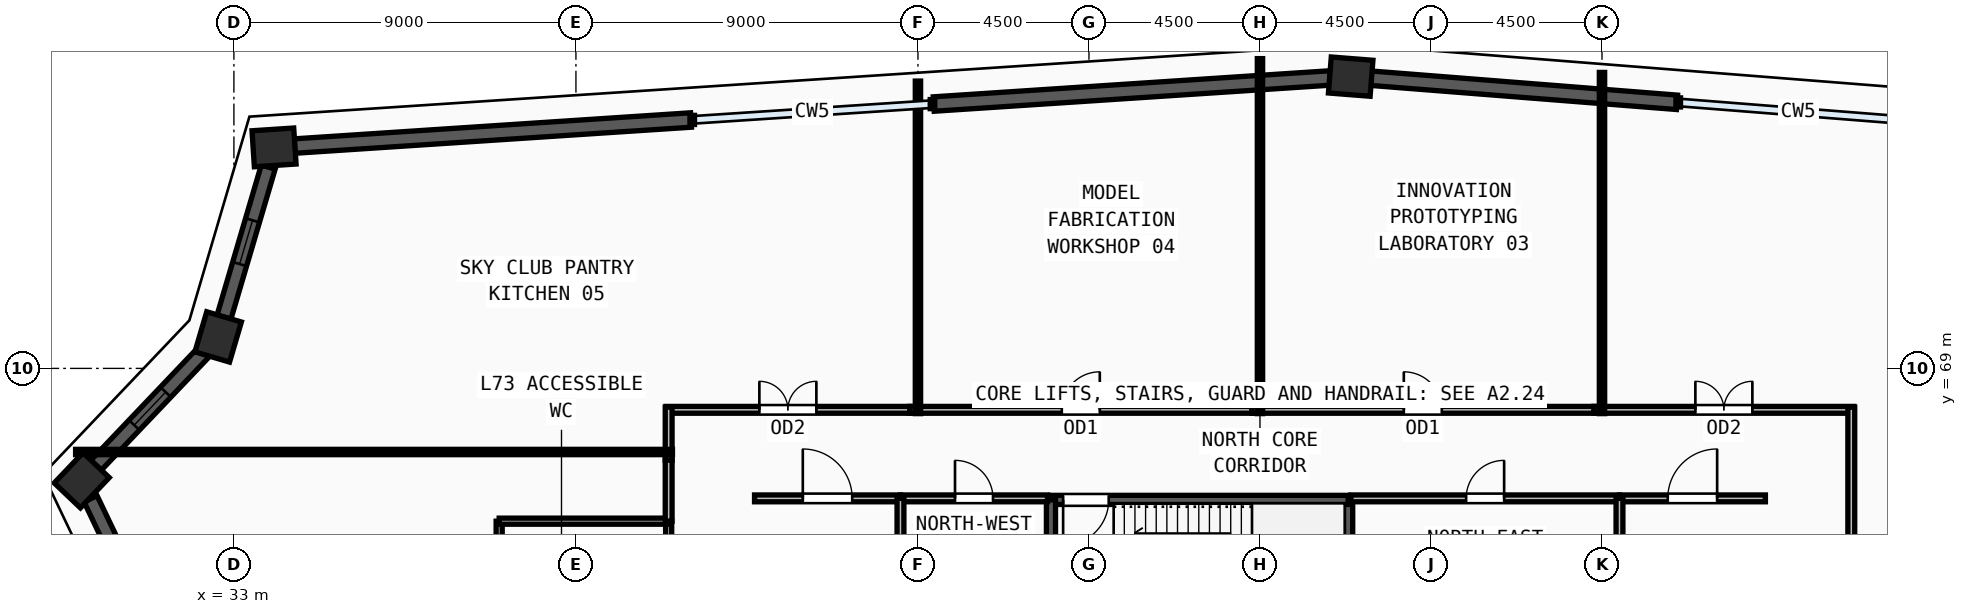
"""IFC4 building model, lengths in metres.
Left out: names, types, materials, properties, quantities, classifications, styles, units other than length and angle.
Written with IfcOpenShell. Run it as: python <this file> out.ifc"""

import sys

from ifc_helpers import new_model, si_unit, direction, frame, frame_2d, origin, origin_2d, place, context, subcontext, project, spatial, rectangle, extrude, source, transform, mapped, element, fill, save


model = new_model("IFC4")
c1 = context("Model", 3, precision=1e-05, world=origin(), true_north=direction((0.0, 1.0)))
c2 = subcontext(c1, "Body", "Model", "MODEL_VIEW")
j1 = project(units=[si_unit("LENGTHUNIT", "METRE"), si_unit("PLANEANGLEUNIT", "RADIAN")], contexts=[c1])
p1 = place(None, origin())
s1 = spatial("IfcSite", under=j1, at=p1, CompositionType="ELEMENT")
p2 = place(p1, origin())
s2 = spatial("IfcBuilding", under=s1, at=p2, CompositionType="ELEMENT")
p3 = place(p2, frame((0.0, 0.0, 282.0)))
s3 = spatial("IfcBuildingStorey", under=s2, at=p3, CompositionType="ELEMENT", Elevation=282.0)
m1 = source(origin(), c2, "Body", "SweptSolid", [
    extrude(rectangle(XDim=1.1, YDim=0.95, at=origin_2d()), origin(), (0.0, 0.0, 1.0), 4.5),
])
for number, where, z_axis, x_axis in (
    (1, (28.996, 66.056, 0.0), (0.0, 0.0, 1.0), (0.689, 0.724, 0.0)),
    (2, (32.585, 69.828, 0.0), (0.0, 0.0, 1.0), (0.283, 0.959, 0.0)),
    (3, (34.056, 74.815, 0.0), (0.0, 0.0, 1.0), (0.998, 0.066, 0.0)),
    (4, (62.387, 76.677, 0.0), (0.0, 0.0, 1.0), (-0.997, 0.078, 0.0)),
):
    element("IfcColumn", number, at=place(p3, frame(where, z_axis=z_axis, x_axis=x_axis)), inside=s3, PredefinedType="COLUMN", context=c2, shape_type="MappedRepresentation", body=[
        mapped(m1, transform((0.0, 0.0, 0.0), x_axis=(1.0, 0.0, 0.0), y_axis=(0.0, 1.0, 0.0), z_axis=(0.0, 0.0, 1.0), scale=1.0)),
    ])
p4 = place(p3, frame((70.974, 76.001, 0.0), z_axis=(0.0, 0.0, 1.0), x_axis=(-0.996911930787, 0.078527716469, 0.0)))
e5 = element("IfcWall", 5, at=p4, inside=s3, PredefinedType="SOLIDWALL", context=c2, shape_type="SweptSolid", body=[
    extrude(rectangle(XDim=8.074, YDim=0.38, at=frame_2d((4.037, 0.0))), origin(), (0.0, 0.0, 1.0), 4.32),
])
p5 = place(p3, frame((61.848, 76.642, 0.0), z_axis=(0.0, 0.0, 1.0), x_axis=(-0.997844985263, -0.065615435579, 0.0)))
e6 = element("IfcWall", 6, at=p5, inside=s3, PredefinedType="SOLIDWALL", context=c2, shape_type="SweptSolid", body=[
    extrude(rectangle(XDim=10.455, YDim=0.38, at=frame_2d((5.228, 0.0))), origin(), (0.0, 0.0, 1.0), 4.32),
])
p6 = place(p3, frame((45.028, 75.536, 0.0), z_axis=(0.0, 0.0, 1.0), x_axis=(-0.997846614317, -0.065590657079, 0.0)))
e7 = element("IfcWall", 7, at=p6, inside=s3, PredefinedType="SOLIDWALL", context=c2, shape_type="SweptSolid", body=[
    extrude(rectangle(XDim=10.456, YDim=0.38, at=frame_2d((5.228, 0.0))), origin(), (0.0, 0.0, 1.0), 4.32),
])
p7 = place(p3, frame((33.903, 74.297, 0.0), z_axis=(0.0, 0.0, 1.0), x_axis=(-0.282820834806, -0.959172755764, 0.0)))
e8 = element("IfcWall", 8, at=p7, inside=s3, PredefinedType="SOLIDWALL", context=c2, shape_type="SweptSolid", body=[
    extrude(rectangle(XDim=4.119, YDim=0.38, at=frame_2d((2.06, 0.0))), origin(), (0.0, 0.0, 1.0), 4.32),
])
m2 = source(origin(), c2, "Body", "SweptSolid", [
    extrude(rectangle(XDim=1.2, YDim=1.9, at=frame_2d((0.6, 0.95))), frame((0.0, 0.2, 0.0), z_axis=(0.0, -1.0, 0.0), x_axis=(1.0, 0.0, 0.0)), (0.0, 0.0, 1.0), 0.4),
])
p8 = place(p7, frame((1.46, 0.0, 0.55)))
e9 = element("IfcOpeningElement", 9, at=p8, cuts=e8, PredefinedType="OPENING", context=c2, shape_type="MappedRepresentation", body=[
    mapped(m2, transform((0.0, 0.0, 0.0), x_axis=(1.0, 0.0, 0.0), y_axis=(0.0, 1.0, 0.0), z_axis=(0.0, 0.0, 1.0), scale=1.0)),
])
p9 = place(p3, frame((32.213, 69.437, 0.0), z_axis=(0.0, 0.0, 1.0), x_axis=(-0.689319799557, -0.724457185718, 0.0)))
e10 = element("IfcWall", 10, at=p9, inside=s3, PredefinedType="SOLIDWALL", context=c2, shape_type="SweptSolid", body=[
    extrude(rectangle(XDim=4.127, YDim=0.38, at=frame_2d((2.063, 0.0))), origin(), (0.0, 0.0, 1.0), 4.32),
])
p10 = place(p9, frame((1.464, 0.0, 0.55)))
e11 = element("IfcOpeningElement", 11, at=p10, cuts=e10, PredefinedType="OPENING", context=c2, shape_type="MappedRepresentation", body=[
    mapped(m2, transform((0.0, 0.0, 0.0), x_axis=(1.0, 0.0, 0.0), y_axis=(0.0, 1.0, 0.0), z_axis=(0.0, 0.0, 1.0), scale=1.0)),
])
p11 = place(p3, frame((29.228, 65.569, 0.0), z_axis=(0.0, 0.0, 1.0), x_axis=(0.430494504743, -0.902593198172, 0.0)))
e12 = element("IfcWall", 12, at=p11, inside=s3, PredefinedType="SOLIDWALL", context=c2, shape_type="SweptSolid", body=[
    extrude(rectangle(XDim=8.075, YDim=0.38, at=frame_2d((4.037, 0.0))), origin(), (0.0, 0.0, 1.0), 4.32),
])
p12 = place(p3, frame((62.32, 62.1, 0.0), z_axis=(0.0, 0.0, 1.0), x_axis=(0.0, 1.0, 0.0)))
e13 = element("IfcWall", 13, at=p12, inside=s3, PredefinedType="SOLIDWALL", context=c2, shape_type="SweptSolid", body=[
    extrude(rectangle(XDim=3.44, YDim=0.24, at=frame_2d((1.72, 0.0))), origin(), (0.0, 0.0, 1.0), 4.32),
])
p13 = place(p3, frame((62.32, 65.54, 0.0), z_axis=(0.0, 0.0, 1.0), x_axis=(-1.0, 0.0, 0.0)))
e14 = element("IfcWall", 14, at=p13, inside=s3, PredefinedType="SOLIDWALL", context=c2, shape_type="SweptSolid", body=[
    extrude(rectangle(XDim=7.82, YDim=0.24, at=frame_2d((3.91, 0.0))), origin(), (0.0, 0.0, 1.0), 4.32),
])
m3 = source(origin(), c2, "Body", "SweptSolid", [
    extrude(rectangle(XDim=1.2, YDim=2.2, at=frame_2d((0.6, 1.1))), frame((0.0, 0.13, 0.0), z_axis=(0.0, -1.0, 0.0), x_axis=(1.0, 0.0, 0.0)), (0.0, 0.0, 1.0), 0.26),
])
p14 = place(p13, frame((6.3, 0.0, 0.0)))
e15 = element("IfcOpeningElement", 15, at=p14, cuts=e14, PredefinedType="OPENING", context=c2, shape_type="MappedRepresentation", body=[
    mapped(m3, transform((0.0, 0.0, 0.0), x_axis=(1.0, 0.0, 0.0), y_axis=(0.0, 1.0, 0.0), z_axis=(0.0, 0.0, 1.0), scale=1.0)),
])
p15 = place(p3, frame((54.5, 65.54, 0.0), z_axis=(0.0, 0.0, 1.0), x_axis=(0.0, -1.0, 0.0)))
e16 = element("IfcWall", 16, at=p15, inside=s3, PredefinedType="SOLIDWALL", context=c2, shape_type="SweptSolid", body=[
    extrude(rectangle(XDim=3.44, YDim=0.24, at=frame_2d((1.72, 0.0))), origin(), (0.0, 0.0, 1.0), 4.32),
])
p16 = place(p3, frame((44.44, 62.24, 0.0), z_axis=(0.0, 0.0, 1.0), x_axis=(0.0, 1.0, 0.0)))
e17 = element("IfcWall", 17, at=p16, inside=s3, PredefinedType="PARTITIONING", context=c2, shape_type="SweptSolid", body=[
    extrude(rectangle(XDim=2.74, YDim=0.16, at=frame_2d((1.37, 0.0))), origin(), (0.0, 0.0, 1.0), 4.32),
])
m4 = source(origin(), c2, "Body", "SweptSolid", [
    extrude(rectangle(XDim=1.05, YDim=2.15, at=frame_2d((0.525, 1.075))), frame((0.0, 0.09, 0.0), z_axis=(0.0, -1.0, 0.0), x_axis=(1.0, 0.0, 0.0)), (0.0, 0.0, 1.0), 0.18),
])
p17 = place(p16, frame((0.845, 0.0, 0.0)))
e18 = element("IfcOpeningElement", 18, at=p17, cuts=e17, PredefinedType="OPENING", context=c2, shape_type="MappedRepresentation", body=[
    mapped(m4, transform((0.0, 0.0, 0.0), x_axis=(1.0, 0.0, 0.0), y_axis=(0.0, 1.0, 0.0), z_axis=(0.0, 0.0, 1.0), scale=1.0)),
])
p18 = place(p3, frame((50.54, 65.58, 0.0), z_axis=(0.0, 0.0, 1.0), x_axis=(1.0, 0.0, 0.0)))
e19 = element("IfcWall", 19, at=p18, inside=s3, PredefinedType="PARTITIONING", context=c2, shape_type="SweptSolid", body=[
    extrude(rectangle(XDim=3.87, YDim=0.18, at=frame_2d((1.935, 0.0))), origin(), (0.0, 0.0, 1.0), 4.32),
])
m5 = source(origin(), c2, "Body", "SweptSolid", [
    extrude(rectangle(XDim=1.0, YDim=2.2, at=frame_2d((0.5, 1.1))), frame((0.0, 0.1, 0.0), z_axis=(0.0, -1.0, 0.0), x_axis=(1.0, 0.0, 0.0)), (0.0, 0.0, 1.0), 0.2),
])
p19 = place(p18, frame((1.435, 0.0, 0.0)))
e20 = element("IfcOpeningElement", 20, at=p19, cuts=e19, PredefinedType="OPENING", context=c2, shape_type="MappedRepresentation", body=[
    mapped(m5, transform((0.0, 0.0, 0.0), x_axis=(1.0, 0.0, 0.0), y_axis=(0.0, 1.0, 0.0), z_axis=(0.0, 0.0, 1.0), scale=1.0)),
])
p20 = place(p3, frame((62.39, 65.58, 0.0), z_axis=(0.0, 0.0, 1.0), x_axis=(1.0, 0.0, 0.0)))
e21 = element("IfcWall", 21, at=p20, inside=s3, PredefinedType="PARTITIONING", context=c2, shape_type="SweptSolid", body=[
    extrude(rectangle(XDim=7.07, YDim=0.18, at=frame_2d((3.535, 0.0))), origin(), (0.0, 0.0, 1.0), 4.32),
])
p21 = place(p20, frame((3.035, 0.0, 0.0)))
e22 = element("IfcOpeningElement", 22, at=p21, cuts=e21, PredefinedType="OPENING", context=c2, shape_type="MappedRepresentation", body=[
    mapped(m5, transform((0.0, 0.0, 0.0), x_axis=(1.0, 0.0, 0.0), y_axis=(0.0, 1.0, 0.0), z_axis=(0.0, 0.0, 1.0), scale=1.0)),
])
p22 = place(p3, frame((46.7, 65.58, 0.0), z_axis=(0.0, 0.0, 1.0), x_axis=(1.0, 0.0, 0.0)))
e23 = element("IfcWall", 23, at=p22, inside=s3, PredefinedType="PARTITIONING", context=c2, shape_type="SweptSolid", body=[
    extrude(rectangle(XDim=3.84, YDim=0.18, at=frame_2d((1.92, 0.0))), origin(), (0.0, 0.0, 1.0), 4.32),
])
m6 = source(origin(), c2, "Body", "SweptSolid", [
    extrude(rectangle(XDim=1.3, YDim=2.2, at=frame_2d((0.65, 1.1))), frame((0.0, 0.1, 0.0), z_axis=(0.0, -1.0, 0.0), x_axis=(1.0, 0.0, 0.0)), (0.0, 0.0, 1.0), 0.2),
])
p23 = place(p22, frame((1.27, 0.0, 0.0)))
e24 = element("IfcOpeningElement", 24, at=p23, cuts=e23, PredefinedType="OPENING", context=c2, shape_type="MappedRepresentation", body=[
    mapped(m6, transform((0.0, 0.0, 0.0), x_axis=(1.0, 0.0, 0.0), y_axis=(0.0, 1.0, 0.0), z_axis=(0.0, 0.0, 1.0), scale=1.0)),
])
p24 = place(p3, frame((69.46, 65.58, 0.0), z_axis=(0.0, 0.0, 1.0), x_axis=(1.0, 0.0, 0.0)))
e25 = element("IfcWall", 25, at=p24, inside=s3, PredefinedType="PARTITIONING", context=c2, shape_type="SweptSolid", body=[
    extrude(rectangle(XDim=3.84, YDim=0.18, at=frame_2d((1.92, 0.0))), origin(), (0.0, 0.0, 1.0), 4.32),
])
p25 = place(p24, frame((1.27, 0.0, 0.0)))
e26 = element("IfcOpeningElement", 26, at=p25, cuts=e25, PredefinedType="OPENING", context=c2, shape_type="MappedRepresentation", body=[
    mapped(m6, transform((0.0, 0.0, 0.0), x_axis=(1.0, 0.0, 0.0), y_axis=(0.0, 1.0, 0.0), z_axis=(0.0, 0.0, 1.0), scale=1.0)),
])
p26 = place(p3, frame((68.785, 67.91, 0.0), z_axis=(0.0, 0.0, 1.0), x_axis=(1.0, 0.0, 0.0)))
e27 = element("IfcWall", 27, at=p26, inside=s3, PredefinedType="PARTITIONING", context=c2, shape_type="SweptSolid", body=[
    extrude(rectangle(XDim=6.845, YDim=0.18, at=frame_2d((3.422, 0.0))), origin(), (0.0, 0.0, 1.0), 4.011),
])
m7 = source(origin(), c2, "Body", "SweptSolid", [
    extrude(rectangle(XDim=1.5, YDim=2.2, at=frame_2d((0.75, 1.1))), frame((0.0, 0.1, 0.0), z_axis=(0.0, -1.0, 0.0), x_axis=(1.0, 0.0, 0.0)), (0.0, 0.0, 1.0), 0.2),
])
p27 = place(p26, frame((2.672, 0.0, 0.0)))
e28 = element("IfcOpeningElement", 28, at=p27, cuts=e27, PredefinedType="OPENING", context=c2, shape_type="MappedRepresentation", body=[
    mapped(m7, transform((0.0, 0.0, 0.0), x_axis=(1.0, 0.0, 0.0), y_axis=(0.0, 1.0, 0.0), z_axis=(0.0, 0.0, 1.0), scale=1.0)),
])
p28 = place(p3, frame((59.785, 67.91, 0.0), z_axis=(0.0, 0.0, 1.0), x_axis=(1.0, 0.0, 0.0)))
e29 = element("IfcWall", 29, at=p28, inside=s3, PredefinedType="PARTITIONING", context=c2, shape_type="SweptSolid", body=[
    extrude(rectangle(XDim=9.0, YDim=0.18, at=frame_2d((4.5, 0.0))), origin(), (0.0, 0.0, 1.0), 4.011),
])
p29 = place(p28, frame((4.0, 0.0, 0.0)))
e30 = element("IfcOpeningElement", 30, at=p29, cuts=e29, PredefinedType="OPENING", context=c2, shape_type="MappedRepresentation", body=[
    mapped(m5, transform((0.0, 0.0, 0.0), x_axis=(1.0, 0.0, 0.0), y_axis=(0.0, 1.0, 0.0), z_axis=(0.0, 0.0, 1.0), scale=1.0)),
])
p30 = place(p3, frame((50.785, 67.91, 0.0), z_axis=(0.0, 0.0, 1.0), x_axis=(1.0, 0.0, 0.0)))
e31 = element("IfcWall", 31, at=p30, inside=s3, PredefinedType="PARTITIONING", context=c2, shape_type="SweptSolid", body=[
    extrude(rectangle(XDim=9.0, YDim=0.18, at=frame_2d((4.5, 0.0))), origin(), (0.0, 0.0, 1.0), 4.011),
])
p31 = place(p30, frame((4.0, 0.0, 0.0)))
e32 = element("IfcOpeningElement", 32, at=p31, cuts=e31, PredefinedType="OPENING", context=c2, shape_type="MappedRepresentation", body=[
    mapped(m5, transform((0.0, 0.0, 0.0), x_axis=(1.0, 0.0, 0.0), y_axis=(0.0, 1.0, 0.0), z_axis=(0.0, 0.0, 1.0), scale=1.0)),
])
p32 = place(p3, frame((44.37, 67.91, 0.0), z_axis=(0.0, 0.0, 1.0), x_axis=(1.0, 0.0, 0.0)))
e33 = element("IfcWall", 33, at=p32, inside=s3, PredefinedType="PARTITIONING", context=c2, shape_type="SweptSolid", body=[
    extrude(rectangle(XDim=6.415, YDim=0.18, at=frame_2d((3.208, 0.0))), origin(), (0.0, 0.0, 1.0), 4.32),
])
p33 = place(p32, frame((2.457, 0.0, 0.0)))
e34 = element("IfcOpeningElement", 34, at=p33, cuts=e33, PredefinedType="OPENING", context=c2, shape_type="MappedRepresentation", body=[
    mapped(m7, transform((0.0, 0.0, 0.0), x_axis=(1.0, 0.0, 0.0), y_axis=(0.0, 1.0, 0.0), z_axis=(0.0, 0.0, 1.0), scale=1.0)),
])
p34 = place(p3, frame((39.98, 56.34, 0.0), z_axis=(0.0, 0.0, 1.0), x_axis=(0.0, 1.0, 0.0)))
e35 = element("IfcWall", 35, at=p34, inside=s3, PredefinedType="PARTITIONING", context=c2, shape_type="SweptSolid", body=[
    extrude(rectangle(XDim=8.64, YDim=0.16, at=frame_2d((4.32, 0.0))), origin(), (0.0, 0.0, 1.0), 4.32),
])
p35 = place(p3, frame((39.98, 64.98, 0.0), z_axis=(0.0, 0.0, 1.0), x_axis=(1.0, 0.0, 0.0)))
e36 = element("IfcWall", 36, at=p35, inside=s3, PredefinedType="PARTITIONING", context=c2, shape_type="SweptSolid", body=[
    extrude(rectangle(XDim=4.46, YDim=0.16, at=frame_2d((2.23, 0.0))), origin(), (0.0, 0.0, 1.0), 4.32),
])
for number, where, z_axis, x_axis in (
    (37, (50.54, 61.95, 0.0), (0.0, 0.0, 1.0), (0.0, 1.0, 0.0)),
    (38, (69.46, 61.95, 0.0), (0.0, 0.0, 1.0), (0.0, 1.0, 0.0)),
):
    element("IfcWall", number, at=place(p3, frame(where, z_axis=z_axis, x_axis=x_axis)), inside=s3, PredefinedType="PARTITIONING", context=c2, shape_type="SweptSolid", body=[
        extrude(rectangle(XDim=3.63, YDim=0.18, at=frame_2d((1.815, 0.0))), origin(), (0.0, 0.0, 1.0), 4.32),
    ])
p36 = place(p3, frame((75.56, 67.98, 0.0), z_axis=(0.0, 0.0, 1.0), x_axis=(0.0, -1.0, 0.0)))
e39 = element("IfcWall", 39, at=p36, inside=s3, PredefinedType="PARTITIONING", context=c2, shape_type="SweptSolid", body=[
    extrude(rectangle(XDim=3.765, YDim=0.18, at=frame_2d((1.882, 0.0))), origin(), (0.0, 0.0, 1.0), 4.32),
])
p37 = place(p3, frame((44.44, 66.585, 0.0), z_axis=(0.0, 0.0, 1.0), x_axis=(0.0, 1.0, 0.0)))
e40 = element("IfcWall", 40, at=p37, inside=s3, PredefinedType="PARTITIONING", context=c2, shape_type="SweptSolid", body=[
    extrude(rectangle(XDim=1.395, YDim=0.18, at=frame_2d((0.698, 0.0))), origin(), (0.0, 0.0, 1.0), 4.32),
])
p38 = place(p3, frame((44.44, 64.98, 0.0), z_axis=(0.0, 0.0, 1.0), x_axis=(0.0, 1.0, 0.0)))
e41 = element("IfcWall", 41, at=p38, inside=s3, PredefinedType="PARTITIONING", context=c2, shape_type="SweptSolid", body=[
    extrude(rectangle(XDim=1.605, YDim=0.18, at=frame_2d((0.802, 0.0))), origin(), (0.0, 0.0, 1.0), 4.32),
])
p39 = place(p3, frame((44.54, 66.8, 0.0), z_axis=(0.0, 0.0, 1.0), x_axis=(-1.0, 0.0, 0.0)))
e42 = element("IfcWall", 42, at=p39, inside=s3, PredefinedType="PARTITIONING", context=c2, shape_type="SweptSolid", body=[
    extrude(rectangle(XDim=15.706, YDim=0.14, at=frame_2d((7.853, 0.0))), origin(), (0.0, 0.0, 1.0), 4.32),
])
p40 = place(p3, frame((51.0, 67.81, 0.0), z_axis=(0.0, 0.0, 1.0), x_axis=(0.0, 1.0, 0.0)))
e43 = element("IfcWall", 43, at=p40, inside=s3, PredefinedType="PARTITIONING", context=c2, shape_type="SweptSolid", body=[
    extrude(rectangle(XDim=8.75, YDim=0.14, at=frame_2d((4.375, 0.0))), origin(), (0.0, 0.0, 1.0), 4.32),
])
p41 = place(p3, frame((60.0, 67.81, 0.0), z_axis=(0.0, 0.0, 1.0), x_axis=(0.0, 1.0, 0.0)))
e44 = element("IfcWall", 44, at=p41, inside=s3, PredefinedType="PARTITIONING", context=c2, shape_type="SweptSolid", body=[
    extrude(rectangle(XDim=9.341, YDim=0.14, at=frame_2d((4.67, 0.0))), origin(), (0.0, 0.0, 1.0), 4.32),
])
p42 = place(p3, frame((69.0, 67.81, 0.0), z_axis=(0.0, 0.0, 1.0), x_axis=(0.0, 1.0, 0.0)))
e45 = element("IfcWall", 45, at=p42, inside=s3, PredefinedType="PARTITIONING", context=c2, shape_type="SweptSolid", body=[
    extrude(rectangle(XDim=8.978, YDim=0.14, at=frame_2d((4.489, 0.0))), origin(), (0.0, 0.0, 1.0), 4.32),
])
m8 = source(origin(), c2, "Body", "SweptSolid", [
    extrude(rectangle(XDim=1.2, YDim=1.9, at=frame_2d((0.6, 0.95))), frame((0.0, 0.03, 0.0), z_axis=(0.0, -1.0, 0.0), x_axis=(1.0, 0.0, 0.0)), (0.0, 0.0, 1.0), 0.06),
])
p43 = place(p8, origin())
e46 = element("IfcWindow", 46, at=p43, inside=s3, PartitioningType="SINGLE_PANEL", PredefinedType="WINDOW", context=c2, shape_type="MappedRepresentation", body=[
    mapped(m8, transform((0.0, 0.0, 0.0), x_axis=(1.0, 0.0, 0.0), y_axis=(0.0, 1.0, 0.0), z_axis=(0.0, 0.0, 1.0), scale=1.0)),
])
fill(e9, e46)
p44 = place(p10, origin())
e47 = element("IfcWindow", 47, at=p44, inside=s3, PartitioningType="SINGLE_PANEL", PredefinedType="WINDOW", context=c2, shape_type="MappedRepresentation", body=[
    mapped(m8, transform((0.0, 0.0, 0.0), x_axis=(1.0, 0.0, 0.0), y_axis=(0.0, 1.0, 0.0), z_axis=(0.0, 0.0, 1.0), scale=1.0)),
])
fill(e11, e47)
m9 = source(origin(), c2, "Body", "SweptSolid", [
    extrude(rectangle(XDim=1.2, YDim=2.2, at=frame_2d((0.6, 1.1))), frame((0.0, 0.025, 0.0), z_axis=(0.0, -1.0, 0.0), x_axis=(1.0, 0.0, 0.0)), (0.0, 0.0, 1.0), 0.05),
])
p45 = place(p14, origin())
e48 = element("IfcDoor", 48, at=p45, inside=s3, OperationType="SINGLE_SWING_RIGHT", PredefinedType="DOOR", context=c2, shape_type="MappedRepresentation", body=[
    mapped(m9, transform((0.0, 0.0, 0.0), x_axis=(1.0, 0.0, 0.0), y_axis=(0.0, 1.0, 0.0), z_axis=(0.0, 0.0, 1.0), scale=1.0)),
])
fill(e15, e48)
m10 = source(origin(), c2, "Body", "SweptSolid", [
    extrude(rectangle(XDim=1.0, YDim=2.2, at=frame_2d((0.5, 1.1))), frame((0.0, 0.025, 0.0), z_axis=(0.0, -1.0, 0.0), x_axis=(1.0, 0.0, 0.0)), (0.0, 0.0, 1.0), 0.05),
])
p46 = place(p19, origin())
e49 = element("IfcDoor", 49, at=p46, inside=s3, OperationType="SINGLE_SWING_LEFT", PredefinedType="DOOR", context=c2, shape_type="MappedRepresentation", body=[
    mapped(m10, transform((0.0, 0.0, 0.0), x_axis=(1.0, 0.0, 0.0), y_axis=(0.0, 1.0, 0.0), z_axis=(0.0, 0.0, 1.0), scale=1.0)),
])
fill(e20, e49)
p47 = place(p21, origin())
e50 = element("IfcDoor", 50, at=p47, inside=s3, OperationType="SINGLE_SWING_RIGHT", PredefinedType="DOOR", context=c2, shape_type="MappedRepresentation", body=[
    mapped(m10, transform((0.0, 0.0, 0.0), x_axis=(1.0, 0.0, 0.0), y_axis=(0.0, 1.0, 0.0), z_axis=(0.0, 0.0, 1.0), scale=1.0)),
])
fill(e22, e50)
m11 = source(origin(), c2, "Body", "SweptSolid", [
    extrude(rectangle(XDim=1.3, YDim=2.2, at=frame_2d((0.65, 1.1))), frame((0.0, 0.025, 0.0), z_axis=(0.0, -1.0, 0.0), x_axis=(1.0, 0.0, 0.0)), (0.0, 0.0, 1.0), 0.05),
])
p48 = place(p23, origin())
e51 = element("IfcDoor", 51, at=p48, inside=s3, OperationType="SINGLE_SWING_LEFT", PredefinedType="DOOR", context=c2, shape_type="MappedRepresentation", body=[
    mapped(m11, transform((0.0, 0.0, 0.0), x_axis=(1.0, 0.0, 0.0), y_axis=(0.0, 1.0, 0.0), z_axis=(0.0, 0.0, 1.0), scale=1.0)),
])
fill(e24, e51)
p49 = place(p25, origin())
e52 = element("IfcDoor", 52, at=p49, inside=s3, OperationType="SINGLE_SWING_RIGHT", PredefinedType="DOOR", context=c2, shape_type="MappedRepresentation", body=[
    mapped(m11, transform((0.0, 0.0, 0.0), x_axis=(1.0, 0.0, 0.0), y_axis=(0.0, 1.0, 0.0), z_axis=(0.0, 0.0, 1.0), scale=1.0)),
])
fill(e26, e52)
m12 = source(origin(), c2, "Body", "SweptSolid", [
    extrude(rectangle(XDim=1.5, YDim=2.2, at=frame_2d((0.75, 1.1))), frame((0.0, 0.025, 0.0), z_axis=(0.0, -1.0, 0.0), x_axis=(1.0, 0.0, 0.0)), (0.0, 0.0, 1.0), 0.05),
])
p50 = place(p27, origin())
e53 = element("IfcDoor", 53, at=p50, inside=s3, OperationType="DOUBLE_DOOR_SINGLE_SWING", PredefinedType="DOOR", context=c2, shape_type="MappedRepresentation", body=[
    mapped(m12, transform((0.0, 0.0, 0.0), x_axis=(1.0, 0.0, 0.0), y_axis=(0.0, 1.0, 0.0), z_axis=(0.0, 0.0, 1.0), scale=1.0)),
])
fill(e28, e53)
p51 = place(p29, origin())
e54 = element("IfcDoor", 54, at=p51, inside=s3, OperationType="SINGLE_SWING_LEFT", PredefinedType="DOOR", context=c2, shape_type="MappedRepresentation", body=[
    mapped(m10, transform((0.0, 0.0, 0.0), x_axis=(1.0, 0.0, 0.0), y_axis=(0.0, 1.0, 0.0), z_axis=(0.0, 0.0, 1.0), scale=1.0)),
])
fill(e30, e54)
p52 = place(p31, origin())
e55 = element("IfcDoor", 55, at=p52, inside=s3, OperationType="SINGLE_SWING_RIGHT", PredefinedType="DOOR", context=c2, shape_type="MappedRepresentation", body=[
    mapped(m10, transform((0.0, 0.0, 0.0), x_axis=(1.0, 0.0, 0.0), y_axis=(0.0, 1.0, 0.0), z_axis=(0.0, 0.0, 1.0), scale=1.0)),
])
fill(e32, e55)
p53 = place(p33, origin())
e56 = element("IfcDoor", 56, at=p53, inside=s3, OperationType="DOUBLE_DOOR_SINGLE_SWING", PredefinedType="DOOR", context=c2, shape_type="MappedRepresentation", body=[
    mapped(m12, transform((0.0, 0.0, 0.0), x_axis=(1.0, 0.0, 0.0), y_axis=(0.0, 1.0, 0.0), z_axis=(0.0, 0.0, 1.0), scale=1.0)),
])
fill(e34, e56)
save(model, sys.argv[1])
